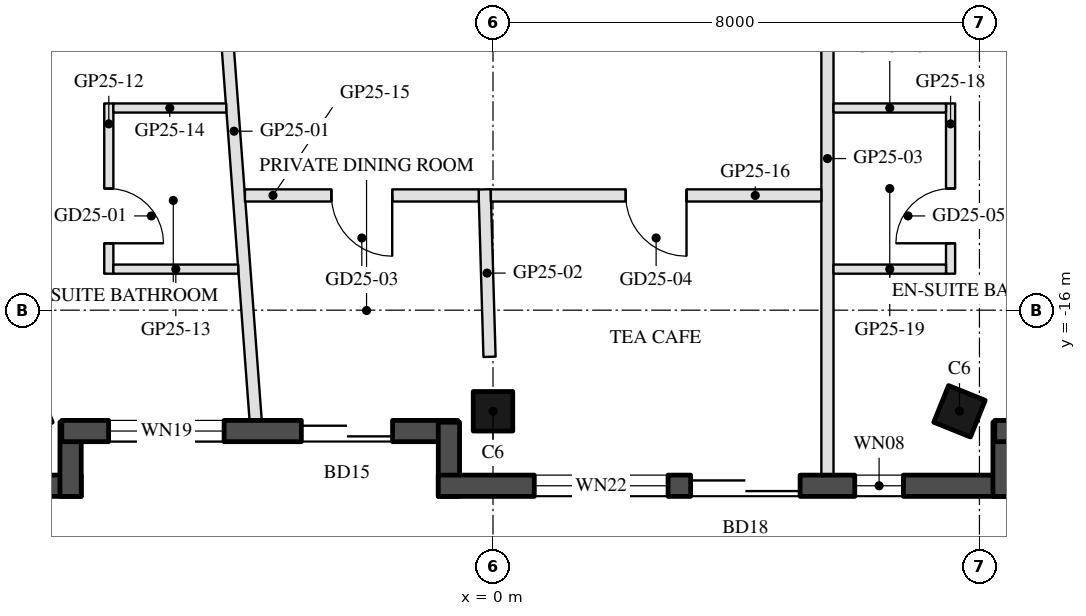
"""IFC4 building model, lengths in metres.
Left out: names, types, materials, properties, quantities, classifications, styles, units other than length and angle.
Written with IfcOpenShell. Run it as: python <this file> out.ifc"""

import sys

from ifc_helpers import new_model, si_unit, direction, frame, frame_2d, origin, origin_2d, place, context, subcontext, project, spatial, rectangle, hollow_rectangle, extrude, boolean, halfspace, element, fill, save


model = new_model("IFC4")
c1 = context("Model", 3, precision=1e-05, world=origin(), true_north=direction((0.0, 1.0)))
c2 = subcontext(c1, "Body", "Model", "MODEL_VIEW")
j1 = project(units=[si_unit("LENGTHUNIT", "METRE"), si_unit("PLANEANGLEUNIT", "RADIAN")], contexts=[c1])
p1 = place(None, origin())
s1 = spatial("IfcSite", under=j1, at=p1, CompositionType="ELEMENT")
p2 = place(p1, origin())
s2 = spatial("IfcBuilding", under=s1, at=p2, CompositionType="ELEMENT")
p3 = place(p2, frame((0.0, 0.0, 265.2)))
s3 = spatial("IfcBuildingStorey", under=s2, at=p3, CompositionType="ELEMENT", Elevation=265.2)
p4 = place(p3, frame((-7.672, -17.663, 0.0), z_axis=(0.060870463553, 0.151232178432, 0.986622326361), x_axis=(-0.99813528898, 0.004713590867, 0.06085825296)))
e1 = element("IfcColumn", 1, at=p4, inside=s3, PredefinedType="COLUMN", context=c2, shape_type="SweptSolid", body=[
    boolean("DIFFERENCE", boolean("DIFFERENCE", extrude(hollow_rectangle(XDim=0.65, YDim=0.65, WallThickness=0.03, at=origin_2d()), origin(), (0.0, 0.0, 1.0), 3.75), halfspace(frame((0.0, 0.0, 0.04), z_axis=(0.0, 0.0, 1.0), x_axis=(1.0, 0.0, 0.0)), True)), halfspace(frame((0.0, 0.0, 3.71), z_axis=(0.0, 0.0, 1.0), x_axis=(1.0, 0.0, 0.0)), False)),
])
p5 = place(p3, frame((0.0, -17.663, 0.0), z_axis=(0.0, 0.151513133163, 0.98845524455), x_axis=(-1.0, 0.0, 0.0)))
e2 = element("IfcColumn", 2, at=p5, inside=s3, PredefinedType="COLUMN", context=c2, shape_type="SweptSolid", body=[
    boolean("DIFFERENCE", boolean("DIFFERENCE", extrude(hollow_rectangle(XDim=0.65, YDim=0.65, WallThickness=0.03, at=origin_2d()), origin(), (0.0, 0.0, 1.0), 3.743), halfspace(frame((0.0, 0.0, 0.037), z_axis=(0.0, 0.0, 1.0), x_axis=(1.0, 0.0, 0.0)), True)), halfspace(frame((0.0, 0.0, 3.706), z_axis=(0.0, 0.0, 1.0), x_axis=(1.0, 0.0, 0.0)), False)),
])
p6 = place(p3, frame((7.672, -17.663, 0.0), z_axis=(-0.060870463553, 0.151232178432, 0.986622326361), x_axis=(0.99813528898, 0.004713590867, 0.06085825296)))
e3 = element("IfcColumn", 3, at=p6, inside=s3, PredefinedType="COLUMN", context=c2, shape_type="SweptSolid", body=[
    boolean("DIFFERENCE", boolean("DIFFERENCE", extrude(hollow_rectangle(XDim=0.65, YDim=0.65, WallThickness=0.03, at=origin_2d()), origin(), (0.0, 0.0, 1.0), 3.75), halfspace(frame((0.0, 0.0, 0.04), z_axis=(0.0, 0.0, 1.0), x_axis=(1.0, 0.0, 0.0)), True)), halfspace(frame((0.0, 0.0, 3.71), z_axis=(0.0, 0.0, 1.0), x_axis=(1.0, 0.0, 0.0)), False)),
])
p7 = place(p3, frame((-18.272, -18.888, 0.0), z_axis=(0.0, 0.0, 1.0), x_axis=(1.0, 0.0, 0.0)))
e4 = element("IfcWall", 4, at=p7, inside=s3, PredefinedType="SOLIDWALL", context=c2, shape_type="SweptSolid", body=[
    extrude(rectangle(XDim=11.5, YDim=0.35, at=frame_2d((5.75, 0.0))), origin(), (0.0, 0.0, 1.0), 3.55),
])
p8 = place(p7, frame((0.38, 0.0, 0.3)))
e5 = element("IfcOpeningElement", 5, at=p8, cuts=e4, PredefinedType="OPENING", context=c2, shape_type="SweptSolid", body=[
    extrude(rectangle(XDim=1.8, YDim=2.65, at=frame_2d((0.9, 1.325))), frame((0.0, 0.185, 0.0), z_axis=(0.0, -1.0, 0.0), x_axis=(1.0, 0.0, 0.0)), (0.0, 0.0, 1.0), 0.37),
])
p9 = place(p7, frame((7.521, 0.0, 0.0)))
e6 = element("IfcOpeningElement", 6, at=p9, cuts=e4, PredefinedType="OPENING", context=c2, shape_type="SweptSolid", body=[
    extrude(rectangle(XDim=2.4, YDim=2.4, at=frame_2d((1.2, 1.2))), frame((0.0, 0.185, 0.0), z_axis=(0.0, -1.0, 0.0), x_axis=(1.0, 0.0, 0.0)), (0.0, 0.0, 1.0), 0.37),
])
p10 = place(p7, frame((4.067, 0.0, 0.3)))
e7 = element("IfcOpeningElement", 7, at=p10, cuts=e4, PredefinedType="OPENING", context=c2, shape_type="SweptSolid", body=[
    extrude(rectangle(XDim=3.1, YDim=2.65, at=frame_2d((1.55, 1.325))), frame((0.0, 0.185, 0.0), z_axis=(0.0, -1.0, 0.0), x_axis=(1.0, 0.0, 0.0)), (0.0, 0.0, 1.0), 0.37),
])
p11 = place(p3, frame((-6.947, -19.063, 0.0), z_axis=(0.0, 0.0, 1.0), x_axis=(0.0, 1.0, 0.0)))
e8 = element("IfcWall", 8, at=p11, inside=s3, PredefinedType="SOLIDWALL", context=c2, shape_type="SweptSolid", body=[
    extrude(rectangle(XDim=1.22, YDim=0.35, at=frame_2d((0.61, 0.0))), origin(), (0.0, 0.0, 1.0), 3.55),
])
p12 = place(p3, frame((-7.092, -17.988, 0.0), z_axis=(0.0, 0.0, 1.0), x_axis=(1.0, 0.0, 0.0)))
e9 = element("IfcWall", 9, at=p12, inside=s3, PredefinedType="SOLIDWALL", context=c2, shape_type="SweptSolid", body=[
    extrude(rectangle(XDim=6.512, YDim=0.35, at=frame_2d((3.256, 0.0))), origin(), (0.0, 0.0, 1.0), 3.55),
])
p13 = place(p12, frame((0.77, 0.0, 0.3)))
e10 = element("IfcOpeningElement", 10, at=p13, cuts=e9, PredefinedType="OPENING", context=c2, shape_type="SweptSolid", body=[
    extrude(rectangle(XDim=1.9, YDim=2.65, at=frame_2d((0.95, 1.325))), frame((0.0, 0.185, 0.0), z_axis=(0.0, -1.0, 0.0), x_axis=(1.0, 0.0, 0.0)), (0.0, 0.0, 1.0), 0.37),
])
p14 = place(p12, frame((3.94, 0.0, 0.0)))
e11 = element("IfcOpeningElement", 11, at=p14, cuts=e9, PredefinedType="OPENING", context=c2, shape_type="SweptSolid", body=[
    extrude(rectangle(XDim=1.5, YDim=2.4, at=frame_2d((0.75, 1.2))), frame((0.0, 0.185, 0.0), z_axis=(0.0, -1.0, 0.0), x_axis=(1.0, 0.0, 0.0)), (0.0, 0.0, 1.0), 0.37),
])
p15 = place(p3, frame((-0.725, -17.843, 0.0), z_axis=(0.0, 0.0, 1.0), x_axis=(0.0, -1.0, 0.0)))
e12 = element("IfcWall", 12, at=p15, inside=s3, PredefinedType="SOLIDWALL", context=c2, shape_type="SweptSolid", body=[
    extrude(rectangle(XDim=1.22, YDim=0.35, at=frame_2d((0.61, 0.0))), origin(), (0.0, 0.0, 1.0), 3.55),
])
p16 = place(p3, frame((-0.9, -18.888, 0.0), z_axis=(0.0, 0.0, 1.0), x_axis=(1.0, 0.0, 0.0)))
e13 = element("IfcWall", 13, at=p16, inside=s3, PredefinedType="SOLIDWALL", context=c2, shape_type="SweptSolid", body=[
    extrude(rectangle(XDim=9.472, YDim=0.35, at=frame_2d((4.736, 0.0))), origin(), (0.0, 0.0, 1.0), 3.55),
])
p17 = place(p16, frame((4.15, 0.0, 0.0)))
e14 = element("IfcOpeningElement", 14, at=p17, cuts=e13, PredefinedType="OPENING", context=c2, shape_type="SweptSolid", body=[
    extrude(rectangle(XDim=1.8, YDim=2.4, at=frame_2d((0.9, 1.2))), frame((0.0, 0.185, 0.0), z_axis=(0.0, -1.0, 0.0), x_axis=(1.0, 0.0, 0.0)), (0.0, 0.0, 1.0), 0.37),
])
p18 = place(p16, frame((1.579, 0.0, 0.3)))
e15 = element("IfcOpeningElement", 15, at=p18, cuts=e13, PredefinedType="OPENING", context=c2, shape_type="SweptSolid", body=[
    extrude(rectangle(XDim=2.2, YDim=2.65, at=frame_2d((1.1, 1.325))), frame((0.0, 0.185, 0.0), z_axis=(0.0, -1.0, 0.0), x_axis=(1.0, 0.0, 0.0)), (0.0, 0.0, 1.0), 0.37),
])
p19 = place(p16, frame((6.85, 0.0, 0.3)))
e16 = element("IfcOpeningElement", 16, at=p19, cuts=e13, PredefinedType="OPENING", context=c2, shape_type="SweptSolid", body=[
    extrude(rectangle(XDim=0.8, YDim=2.65, at=frame_2d((0.4, 1.325))), frame((0.0, 0.185, 0.0), z_axis=(0.0, -1.0, 0.0), x_axis=(1.0, 0.0, 0.0)), (0.0, 0.0, 1.0), 0.37),
])
p20 = place(p3, frame((8.397, -19.063, 0.0), z_axis=(0.0, 0.0, 1.0), x_axis=(0.0, 1.0, 0.0)))
e17 = element("IfcWall", 17, at=p20, inside=s3, PredefinedType="SOLIDWALL", context=c2, shape_type="SweptSolid", body=[
    extrude(rectangle(XDim=1.22, YDim=0.35, at=frame_2d((0.61, 0.0))), origin(), (0.0, 0.0, 1.0), 3.55),
])
p21 = place(p3, frame((8.252, -17.988, 0.0), z_axis=(0.0, 0.0, 1.0), x_axis=(1.0, 0.0, 0.0)))
e18 = element("IfcWall", 18, at=p21, inside=s3, PredefinedType="SOLIDWALL", context=c2, shape_type="SweptSolid", body=[
    extrude(rectangle(XDim=6.512, YDim=0.35, at=frame_2d((3.256, 0.0))), origin(), (0.0, 0.0, 1.0), 3.55),
])
p22 = place(p21, frame((0.77, 0.0, 0.0)))
e19 = element("IfcOpeningElement", 19, at=p22, cuts=e18, PredefinedType="OPENING", context=c2, shape_type="SweptSolid", body=[
    extrude(rectangle(XDim=2.4, YDim=2.4, at=frame_2d((1.2, 1.2))), frame((0.0, 0.185, 0.0), z_axis=(0.0, -1.0, 0.0), x_axis=(1.0, 0.0, 0.0)), (0.0, 0.0, 1.0), 0.37),
])
p23 = place(p21, frame((3.47, 0.0, 0.3)))
e20 = element("IfcOpeningElement", 20, at=p23, cuts=e18, PredefinedType="OPENING", context=c2, shape_type="SweptSolid", body=[
    extrude(rectangle(XDim=2.2, YDim=2.65, at=frame_2d((1.1, 1.325))), frame((0.0, 0.185, 0.0), z_axis=(0.0, -1.0, 0.0), x_axis=(1.0, 0.0, 0.0)), (0.0, 0.0, 1.0), 0.37),
])
p24 = place(p3, frame((8.547, -10.997, 0.0), z_axis=(0.0, 0.0, 1.0), x_axis=(0.86602744543, -0.49999646375, 0.0)))
e21 = element("IfcWall", 21, at=p24, inside=s3, PredefinedType="SHEAR", context=c2, shape_type="SweptSolid", body=[
    extrude(rectangle(XDim=13.934, YDim=0.5, at=frame_2d((6.967, 0.0))), origin(), (0.0, 0.0, 1.0), 3.5),
])
p25 = place(p3, frame((-3.903, -17.813, 0.0), z_axis=(0.0, 0.0, 1.0), x_axis=(-0.074602257677, 0.997213368918, 0.0)))
e22 = element("IfcWall", 22, at=p25, inside=s3, PredefinedType="PARTITIONING", context=c2, shape_type="SweptSolid", body=[
    extrude(rectangle(XDim=9.54, YDim=0.2, at=frame_2d((4.77, 0.0))), origin(), (0.0, 0.0, 1.0), 3.1),
])
p26 = place(p3, frame((-0.057, -16.767, 0.0), z_axis=(0.0, 0.0, 1.0), x_axis=(-0.029417278295, 0.999567218219, 0.0)))
e23 = element("IfcWall", 23, at=p26, inside=s3, PredefinedType="PARTITIONING", context=c2, shape_type="SweptSolid", body=[
    extrude(rectangle(XDim=2.755, YDim=0.2, at=frame_2d((1.378, 0.0))), origin(), (0.0, 0.0, 1.0), 3.0),
])
p27 = place(p3, frame((5.5, -18.713, 0.0), z_axis=(0.0, 0.0, 1.0), x_axis=(0.0, 1.0, 0.0)))
e24 = element("IfcWall", 24, at=p27, inside=s3, PredefinedType="PARTITIONING", context=c2, shape_type="SweptSolid", body=[
    extrude(rectangle(XDim=10.413, YDim=0.2, at=frame_2d((5.207, 0.0))), origin(), (0.0, 0.0, 1.0), 3.1),
])
p28 = place(p3, frame((-6.319, -12.6, 0.0), z_axis=(0.0, 0.0, 1.0), x_axis=(0.0, -1.0, 0.0)))
e25 = element("IfcWall", 25, at=p28, inside=s3, PredefinedType="PARTITIONING", context=c2, shape_type="SweptSolid", body=[
    extrude(rectangle(XDim=2.8, YDim=0.15, at=frame_2d((1.4, 0.0))), origin(), (0.0, 0.0, 1.0), 3.55),
])
p29 = place(p28, frame((1.4, 0.0, 0.0)))
e26 = element("IfcOpeningElement", 26, at=p29, cuts=e25, PredefinedType="OPENING", context=c2, shape_type="SweptSolid", body=[
    extrude(rectangle(XDim=0.9, YDim=2.1, at=frame_2d((0.45, 1.05))), frame((0.0, 0.085, 0.0), z_axis=(0.0, -1.0, 0.0), x_axis=(1.0, 0.0, 0.0)), (0.0, 0.0, 1.0), 0.17),
])
p30 = place(p3, frame((-6.243, -15.325, 0.0), z_axis=(0.0, 0.0, 1.0), x_axis=(1.0, 0.0, 0.0)))
e27 = element("IfcWall", 27, at=p30, inside=s3, PredefinedType="PARTITIONING", context=c2, shape_type="SweptSolid", body=[
    extrude(rectangle(XDim=2.054, YDim=0.15, at=frame_2d((1.027, 0.0))), origin(), (0.0, 0.0, 1.0), 3.55),
])
p31 = place(p3, frame((-6.243, -12.675, 0.0), z_axis=(0.0, 0.0, 1.0), x_axis=(1.0, 0.0, 0.0)))
e28 = element("IfcWall", 28, at=p31, inside=s3, PredefinedType="PARTITIONING", context=c2, shape_type="SweptSolid", body=[
    extrude(rectangle(XDim=1.855, YDim=0.15, at=frame_2d((0.928, 0.0))), origin(), (0.0, 0.0, 1.0), 3.55),
])
p32 = place(p3, frame((-0.235, -14.113, 0.0), z_axis=(0.0, 0.0, 1.0), x_axis=(-1.0, 0.0, 0.0)))
e29 = element("IfcWall", 29, at=p32, inside=s3, PredefinedType="PARTITIONING", context=c2, shape_type="SweptSolid", body=[
    extrude(rectangle(XDim=3.845, YDim=0.2, at=frame_2d((1.922, 0.0))), origin(), (0.0, 0.0, 1.0), 3.0),
])
p33 = place(p32, frame((1.422, 0.0, 0.0)))
e30 = element("IfcOpeningElement", 30, at=p33, cuts=e29, PredefinedType="OPENING", context=c2, shape_type="SweptSolid", body=[
    extrude(rectangle(XDim=1.0, YDim=2.1, at=frame_2d((0.5, 1.05))), frame((0.0, 0.11, 0.0), z_axis=(0.0, -1.0, 0.0), x_axis=(1.0, 0.0, 0.0)), (0.0, 0.0, 1.0), 0.22),
])
p34 = place(p3, frame((5.4, -14.113, 0.0), z_axis=(0.0, 0.0, 1.0), x_axis=(-1.0, 0.0, 0.0)))
e31 = element("IfcWall", 31, at=p34, inside=s3, PredefinedType="PARTITIONING", context=c2, shape_type="SweptSolid", body=[
    extrude(rectangle(XDim=5.435, YDim=0.2, at=frame_2d((2.718, 0.0))), origin(), (0.0, 0.0, 1.0), 3.0),
])
p35 = place(p34, frame((2.218, 0.0, 0.0)))
e32 = element("IfcOpeningElement", 32, at=p35, cuts=e31, PredefinedType="OPENING", context=c2, shape_type="SweptSolid", body=[
    extrude(rectangle(XDim=1.0, YDim=2.1, at=frame_2d((0.5, 1.05))), frame((0.0, 0.11, 0.0), z_axis=(0.0, -1.0, 0.0), x_axis=(1.0, 0.0, 0.0)), (0.0, 0.0, 1.0), 0.22),
])
p36 = place(p3, frame((7.525, -15.4, 0.0), z_axis=(0.0, 0.0, 1.0), x_axis=(0.0, 1.0, 0.0)))
e33 = element("IfcWall", 33, at=p36, inside=s3, PredefinedType="PARTITIONING", context=c2, shape_type="SweptSolid", body=[
    extrude(rectangle(XDim=2.8, YDim=0.15, at=frame_2d((1.4, 0.0))), origin(), (0.0, 0.0, 1.0), 3.0),
])
p37 = place(p36, frame((0.5, 0.0, 0.0)))
e34 = element("IfcOpeningElement", 34, at=p37, cuts=e33, PredefinedType="OPENING", context=c2, shape_type="SweptSolid", body=[
    extrude(rectangle(XDim=0.9, YDim=2.1, at=frame_2d((0.45, 1.05))), frame((0.0, 0.085, 0.0), z_axis=(0.0, -1.0, 0.0), x_axis=(1.0, 0.0, 0.0)), (0.0, 0.0, 1.0), 0.17),
])
for number, where, z_axis, x_axis in (
    (35, (5.6, -15.325, 0.0), (0.0, 0.0, 1.0), (1.0, 0.0, 0.0)),
    (36, (5.6, -12.675, 0.0), (0.0, 0.0, 1.0), (1.0, 0.0, 0.0)),
):
    element("IfcWall", number, at=place(p3, frame(where, z_axis=z_axis, x_axis=x_axis)), inside=s3, PredefinedType="PARTITIONING", context=c2, shape_type="SweptSolid", body=[
        extrude(rectangle(XDim=1.85, YDim=0.15, at=frame_2d((0.925, 0.0))), origin(), (0.0, 0.0, 1.0), 3.0),
    ])
p38 = place(p13, origin())
e37 = element("IfcWindow", 37, at=p38, inside=s3, PartitioningType="SINGLE_PANEL", PredefinedType="WINDOW", context=c2, shape_type="SweptSolid", body=[
    extrude(rectangle(XDim=1.9, YDim=2.65, at=frame_2d((0.95, 1.325))), frame((0.0, 0.03, 0.0), z_axis=(0.0, -1.0, 0.0), x_axis=(1.0, 0.0, 0.0)), (0.0, 0.0, 1.0), 0.06),
])
fill(e10, e37)
p39 = place(p14, frame((1.5, 0.0, 0.0), z_axis=(0.0, 0.0, 1.0), x_axis=(-1.0, 0.0, 0.0)))
e38 = element("IfcDoor", 38, at=p39, inside=s3, OperationType="SLIDING_TO_LEFT", PredefinedType="DOOR", context=c2, shape_type="SweptSolid", body=[
    extrude(rectangle(XDim=1.5, YDim=2.4, at=frame_2d((0.75, 1.2))), frame((0.0, 0.025, 0.0), z_axis=(0.0, -1.0, 0.0), x_axis=(1.0, 0.0, 0.0)), (0.0, 0.0, 1.0), 0.05),
])
fill(e11, e38)
p40 = place(p17, frame((1.8, 0.0, 0.0), z_axis=(0.0, 0.0, 1.0), x_axis=(-1.0, 0.0, 0.0)))
e39 = element("IfcDoor", 39, at=p40, inside=s3, OperationType="SLIDING_TO_LEFT", PredefinedType="DOOR", context=c2, shape_type="SweptSolid", body=[
    extrude(rectangle(XDim=1.8, YDim=2.4, at=frame_2d((0.9, 1.2))), frame((0.0, 0.025, 0.0), z_axis=(0.0, -1.0, 0.0), x_axis=(1.0, 0.0, 0.0)), (0.0, 0.0, 1.0), 0.05),
])
fill(e14, e39)
p41 = place(p18, origin())
e40 = element("IfcWindow", 40, at=p41, inside=s3, PartitioningType="SINGLE_PANEL", PredefinedType="WINDOW", context=c2, shape_type="SweptSolid", body=[
    extrude(rectangle(XDim=2.2, YDim=2.65, at=frame_2d((1.1, 1.325))), frame((0.0, 0.03, 0.0), z_axis=(0.0, -1.0, 0.0), x_axis=(1.0, 0.0, 0.0)), (0.0, 0.0, 1.0), 0.06),
])
fill(e15, e40)
p42 = place(p19, origin())
e41 = element("IfcWindow", 41, at=p42, inside=s3, PartitioningType="SINGLE_PANEL", PredefinedType="WINDOW", context=c2, shape_type="SweptSolid", body=[
    extrude(rectangle(XDim=0.8, YDim=2.65, at=frame_2d((0.4, 1.325))), frame((0.0, 0.03, 0.0), z_axis=(0.0, -1.0, 0.0), x_axis=(1.0, 0.0, 0.0)), (0.0, 0.0, 1.0), 0.06),
])
fill(e16, e41)
p43 = place(p29, origin())
e42 = element("IfcDoor", 42, at=p43, inside=s3, OperationType="SINGLE_SWING_RIGHT", PredefinedType="DOOR", context=c2, shape_type="SweptSolid", body=[
    extrude(rectangle(XDim=0.9, YDim=2.1, at=frame_2d((0.45, 1.05))), frame((0.0, 0.025, 0.0), z_axis=(0.0, -1.0, 0.0), x_axis=(1.0, 0.0, 0.0)), (0.0, 0.0, 1.0), 0.05),
])
fill(e26, e42)
p44 = place(p33, origin())
e43 = element("IfcDoor", 43, at=p44, inside=s3, OperationType="SINGLE_SWING_LEFT", PredefinedType="DOOR", context=c2, shape_type="SweptSolid", body=[
    extrude(rectangle(XDim=1.0, YDim=2.1, at=frame_2d((0.5, 1.05))), frame((0.0, 0.025, 0.0), z_axis=(0.0, -1.0, 0.0), x_axis=(1.0, 0.0, 0.0)), (0.0, 0.0, 1.0), 0.05),
])
fill(e30, e43)
p45 = place(p35, origin())
e44 = element("IfcDoor", 44, at=p45, inside=s3, OperationType="SINGLE_SWING_LEFT", PredefinedType="DOOR", context=c2, shape_type="SweptSolid", body=[
    extrude(rectangle(XDim=1.0, YDim=2.1, at=frame_2d((0.5, 1.05))), frame((0.0, 0.025, 0.0), z_axis=(0.0, -1.0, 0.0), x_axis=(1.0, 0.0, 0.0)), (0.0, 0.0, 1.0), 0.05),
])
fill(e32, e44)
p46 = place(p37, origin())
e45 = element("IfcDoor", 45, at=p46, inside=s3, OperationType="SINGLE_SWING_LEFT", PredefinedType="DOOR", context=c2, shape_type="SweptSolid", body=[
    extrude(rectangle(XDim=0.9, YDim=2.1, at=frame_2d((0.45, 1.05))), frame((0.0, 0.025, 0.0), z_axis=(0.0, -1.0, 0.0), x_axis=(1.0, 0.0, 0.0)), (0.0, 0.0, 1.0), 0.05),
])
fill(e34, e45)
save(model, sys.argv[1])
